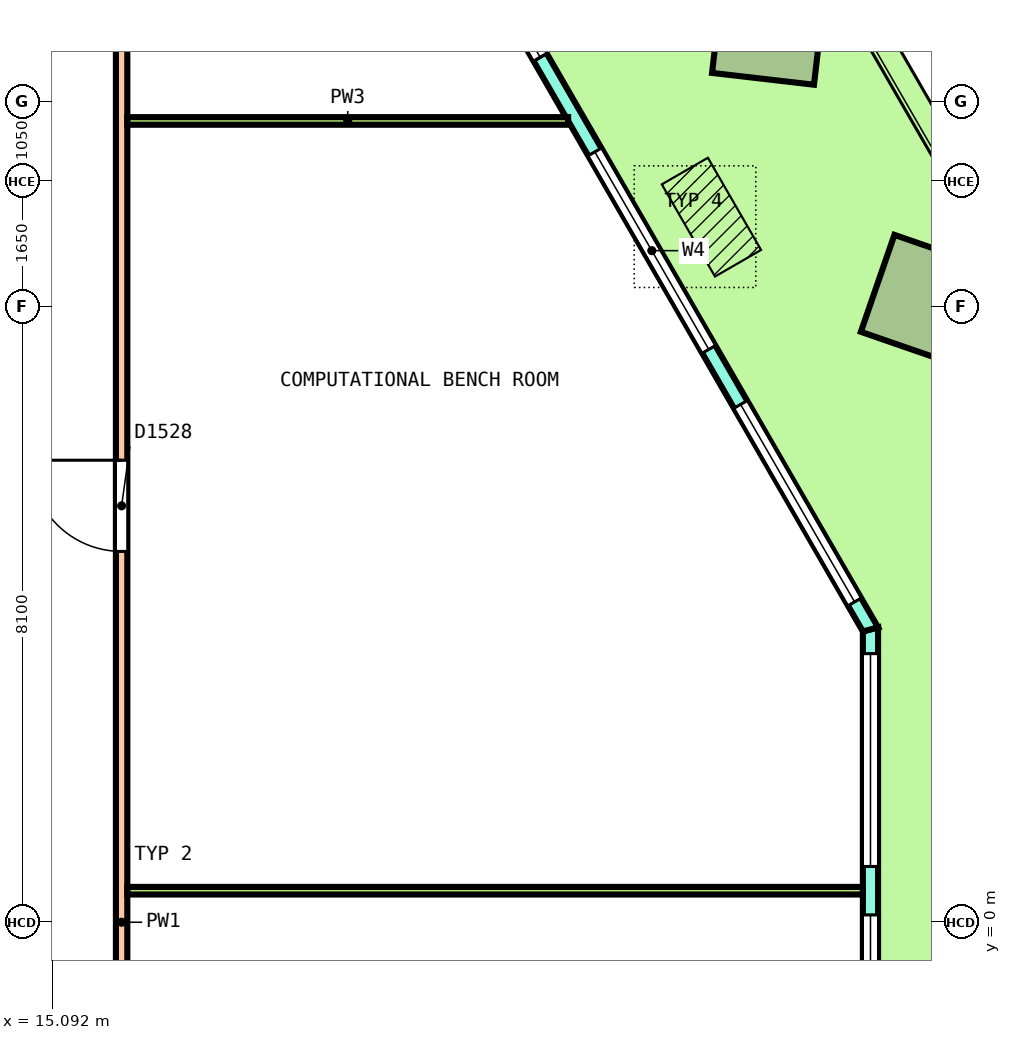
"""IFC4 building model, lengths in metres.
Left out: names, types, materials, properties, quantities, classifications, styles, units other than length and angle.
Written with IfcOpenShell. Run it as: python <this file> out.ifc"""

import sys

from ifc_helpers import new_model, si_unit, direction, frame, frame_2d, origin, origin_2d, place, context, subcontext, project, spatial, polyline, rectangle, outline, extrude, element, fill, save


model = new_model("IFC4")
c1 = context("Model", 3, precision=1e-05, world=origin(), true_north=direction((0.0, 1.0)))
c2 = subcontext(c1, "Body", "Model", "MODEL_VIEW")
j1 = project(units=[si_unit("LENGTHUNIT", "METRE"), si_unit("PLANEANGLEUNIT", "RADIAN")], contexts=[c1])
p1 = place(None, origin())
s1 = spatial("IfcSite", under=j1, at=p1, CompositionType="ELEMENT")
p2 = place(p1, origin())
s2 = spatial("IfcBuilding", under=s1, at=p2, CompositionType="ELEMENT")
p3 = place(p2, frame((0.0, 0.0, 94.0)))
s3 = spatial("IfcBuildingStorey", under=s2, at=p3, CompositionType="ELEMENT", Elevation=94.0)
p4 = place(p3, frame((26.584, 8.184, 0.0), z_axis=(0.021749390218, 0.025123256844, 0.9994477405), x_axis=(-0.500502362591, 0.865666942435, -0.01086875412)))
e1 = element("IfcColumn", 1, at=p4, inside=s3, PredefinedType="COLUMN", context=c2, shape_type="SweptSolid", body=[
    extrude(rectangle(XDim=1.35, YDim=1.35, at=origin_2d()), origin(), (0.0, 0.0, 1.0), 4.052),
])
p5 = place(p3, frame((24.516, 11.766, 0.0), z_axis=(0.025365582388, 0.018858497119, 0.999500347332), x_axis=(-0.500321526885, 0.865832042738, -0.003639162491)))
e2 = element("IfcColumn", 2, at=p5, inside=s3, PredefinedType="COLUMN", context=c2, shape_type="SweptSolid", body=[
    extrude(rectangle(XDim=1.35, YDim=1.35, at=origin_2d()), origin(), (0.0, 0.0, 1.0), 4.052),
])
p6 = place(p3, frame((25.852, -3.022, 0.0), z_axis=(0.0, 0.0, 1.0), x_axis=(0.0, 1.0, 0.0)))
e3 = element("IfcWall", 3, at=p6, inside=s3, PredefinedType="SOLIDWALL", context=c2, shape_type="SweptSolid", body=[
    extrude(outline(polyline([(-0.027, -0.1), (1.128, -0.1), (2.282, -0.1), (3.437, -0.1), (4.592, -0.1), (5.747, -0.1), (6.901, -0.1), (6.848, 0.1), (5.711, 0.1), (4.574, 0.1), (3.437, 0.1), (2.301, 0.1), (1.164, 0.1), (0.027, 0.1), (-0.027, -0.1)])), origin(), (0.0, 0.0, 1.0), 4.1),
])
p7 = place(p6, frame((0.319, 0.0, 0.1)))
e4 = element("IfcOpeningElement", 4, at=p7, cuts=e3, PredefinedType="OPENING", context=c2, shape_type="SweptSolid", body=[
    extrude(rectangle(XDim=2.8, YDim=2.9, at=frame_2d((1.4, 1.45))), frame((0.0, 0.11, 0.0), z_axis=(0.0, -1.0, 0.0), x_axis=(1.0, 0.0, 0.0)), (0.0, 0.0, 1.0), 0.22),
])
p8 = place(p6, frame((3.756, 0.0, 0.1)))
e5 = element("IfcOpeningElement", 5, at=p8, cuts=e3, PredefinedType="OPENING", context=c2, shape_type="SweptSolid", body=[
    extrude(rectangle(XDim=2.8, YDim=2.9, at=frame_2d((1.4, 1.45))), frame((0.0, 0.11, 0.0), z_axis=(0.0, -1.0, 0.0), x_axis=(1.0, 0.0, 0.0)), (0.0, 0.0, 1.0), 0.22),
])
p9 = place(p3, frame((25.852, 3.852, 0.0), z_axis=(0.0, 0.0, 1.0), x_axis=(-0.499998279088, 0.866026397351, 0.0)))
e6 = element("IfcWall", 6, at=p9, inside=s3, PredefinedType="SOLIDWALL", context=c2, shape_type="SweptSolid", body=[
    extrude(outline(polyline([(-0.027, -0.1), (0.985, -0.1), (1.998, -0.1), (3.01, -0.1), (4.022, -0.1), (5.035, -0.1), (6.047, -0.1), (7.059, -0.1), (8.072, -0.1), (9.084, -0.1), (10.096, -0.1), (11.109, -0.1), (12.121, -0.1), (13.133, -0.1), (14.146, -0.1), (15.158, -0.1), (16.17, -0.1), (17.182, -0.1), (18.195, -0.1), (19.207, -0.1), (19.153, 0.1), (18.147, 0.1), (17.14, 0.1), (16.133, 0.1), (15.127, 0.1), (14.12, 0.1), (13.113, 0.1), (12.107, 0.1), (11.1, 0.1), (10.094, 0.1), (9.087, 0.1), (8.08, 0.1), (7.073, 0.1), (6.067, 0.1), (5.06, 0.1), (4.053, 0.1), (3.047, 0.1), (2.04, 0.1), (1.033, 0.1), (0.027, 0.1), (-0.027, -0.1)])), origin(), (0.0, 0.0, 1.0), 4.1),
])
p10 = place(p9, frame((0.418, 0.0, 0.1)))
e7 = element("IfcOpeningElement", 7, at=p10, cuts=e6, PredefinedType="OPENING", context=c2, shape_type="SweptSolid", body=[
    extrude(rectangle(XDim=3.0, YDim=2.9, at=frame_2d((1.5, 1.45))), frame((0.0, 0.11, 0.0), z_axis=(0.0, -1.0, 0.0), x_axis=(1.0, 0.0, 0.0)), (0.0, 0.0, 1.0), 0.22),
])
p11 = place(p9, frame((4.254, 0.0, 0.1)))
e8 = element("IfcOpeningElement", 8, at=p11, cuts=e6, PredefinedType="OPENING", context=c2, shape_type="SweptSolid", body=[
    extrude(rectangle(XDim=3.0, YDim=2.9, at=frame_2d((1.5, 1.45))), frame((0.0, 0.11, 0.0), z_axis=(0.0, -1.0, 0.0), x_axis=(1.0, 0.0, 0.0)), (0.0, 0.0, 1.0), 0.22),
])
p12 = place(p9, frame((8.69, 0.0, 0.0)))
e9 = element("IfcOpeningElement", 9, at=p12, cuts=e6, PredefinedType="OPENING", context=c2, shape_type="SweptSolid", body=[
    extrude(rectangle(XDim=1.8, YDim=2.4, at=frame_2d((0.9, 1.2))), frame((0.0, 0.11, 0.0), z_axis=(0.0, -1.0, 0.0), x_axis=(1.0, 0.0, 0.0)), (0.0, 0.0, 1.0), 0.22),
])
p13 = place(p9, frame((8.69, 0.0, 2.55)))
e10 = element("IfcOpeningElement", 10, at=p13, cuts=e6, PredefinedType="OPENING", context=c2, shape_type="SweptSolid", body=[
    extrude(rectangle(XDim=1.8, YDim=0.45, at=frame_2d((0.9, 0.225))), frame((0.0, 0.11, 0.0), z_axis=(0.0, -1.0, 0.0), x_axis=(1.0, 0.0, 0.0)), (0.0, 0.0, 1.0), 0.22),
])
p14 = place(p9, frame((11.926, 0.0, 0.1)))
e11 = element("IfcOpeningElement", 11, at=p14, cuts=e6, PredefinedType="OPENING", context=c2, shape_type="SweptSolid", body=[
    extrude(rectangle(XDim=3.0, YDim=2.9, at=frame_2d((1.5, 1.45))), frame((0.0, 0.11, 0.0), z_axis=(0.0, -1.0, 0.0), x_axis=(1.0, 0.0, 0.0)), (0.0, 0.0, 1.0), 0.22),
])
p15 = place(p9, frame((15.762, 0.0, 0.1)))
e12 = element("IfcOpeningElement", 12, at=p15, cuts=e6, PredefinedType="OPENING", context=c2, shape_type="SweptSolid", body=[
    extrude(rectangle(XDim=3.0, YDim=2.9, at=frame_2d((1.5, 1.45))), frame((0.0, 0.11, 0.0), z_axis=(0.0, -1.0, 0.0), x_axis=(1.0, 0.0, 0.0)), (0.0, 0.0, 1.0), 0.22),
])
p16 = place(p3, frame((16.0, -13.525, 0.0), z_axis=(0.0, 0.0, 1.0), x_axis=(0.0, 1.0, 0.0)))
e13 = element("IfcWall", 13, at=p16, inside=s3, PredefinedType="PARTITIONING", context=c2, shape_type="SweptSolid", body=[
    extrude(rectangle(XDim=27.05, YDim=0.15, at=frame_2d((13.525, 0.0))), origin(), (0.0, 0.0, 1.0), 3.05),
])
p17 = place(p16, frame((18.403, 0.0, 0.0)))
e14 = element("IfcOpeningElement", 14, at=p17, cuts=e13, PredefinedType="OPENING", context=c2, shape_type="SweptSolid", body=[
    extrude(rectangle(XDim=1.2, YDim=2.1, at=frame_2d((0.6, 1.05))), frame((0.0, 0.085, 0.0), z_axis=(0.0, -1.0, 0.0), x_axis=(1.0, 0.0, 0.0)), (0.0, 0.0, 1.0), 0.17),
])
p18 = place(p16, frame((25.435, 0.0, 0.0)))
e15 = element("IfcOpeningElement", 15, at=p18, cuts=e13, PredefinedType="OPENING", context=c2, shape_type="SweptSolid", body=[
    extrude(rectangle(XDim=1.0, YDim=2.1, at=frame_2d((0.5, 1.05))), frame((0.0, 0.085, 0.0), z_axis=(0.0, -1.0, 0.0), x_axis=(1.0, 0.0, 0.0)), (0.0, 0.0, 1.0), 0.17),
])
p19 = place(p16, frame((1.542, 0.0, 0.0)))
e16 = element("IfcOpeningElement", 16, at=p19, cuts=e13, PredefinedType="OPENING", context=c2, shape_type="SweptSolid", body=[
    extrude(rectangle(XDim=1.0, YDim=2.1, at=frame_2d((0.5, 1.05))), frame((0.0, 0.085, 0.0), z_axis=(0.0, -1.0, 0.0), x_axis=(1.0, 0.0, 0.0)), (0.0, 0.0, 1.0), 0.17),
])
p20 = place(p16, frame((4.605, 0.0, 0.0)))
e17 = element("IfcOpeningElement", 17, at=p20, cuts=e13, PredefinedType="OPENING", context=c2, shape_type="SweptSolid", body=[
    extrude(rectangle(XDim=1.0, YDim=2.1, at=frame_2d((0.5, 1.05))), frame((0.0, 0.085, 0.0), z_axis=(0.0, -1.0, 0.0), x_axis=(1.0, 0.0, 0.0)), (0.0, 0.0, 1.0), 0.17),
])
p21 = place(p16, frame((7.904, 0.0, 0.0)))
e18 = element("IfcOpeningElement", 18, at=p21, cuts=e13, PredefinedType="OPENING", context=c2, shape_type="SweptSolid", body=[
    extrude(rectangle(XDim=1.0, YDim=2.1, at=frame_2d((0.5, 1.05))), frame((0.0, 0.085, 0.0), z_axis=(0.0, -1.0, 0.0), x_axis=(1.0, 0.0, 0.0)), (0.0, 0.0, 1.0), 0.17),
])
p22 = place(p16, frame((11.267, 0.0, 0.0)))
e19 = element("IfcOpeningElement", 19, at=p22, cuts=e13, PredefinedType="OPENING", context=c2, shape_type="SweptSolid", body=[
    extrude(rectangle(XDim=1.0, YDim=2.1, at=frame_2d((0.5, 1.05))), frame((0.0, 0.085, 0.0), z_axis=(0.0, -1.0, 0.0), x_axis=(1.0, 0.0, 0.0)), (0.0, 0.0, 1.0), 0.17),
])
p23 = place(p3, frame((16.075, 10.542, 0.0), z_axis=(0.0, 0.0, 1.0), x_axis=(1.0, 0.0, 0.0)))
e20 = element("IfcWall", 20, at=p23, inside=s3, PredefinedType="PARTITIONING", context=c2, shape_type="SweptSolid", body=[
    extrude(rectangle(XDim=5.8, YDim=0.1, at=frame_2d((2.9, 0.0))), origin(), (0.0, 0.0, 1.0), 3.05),
])
p24 = place(p3, frame((16.075, 0.415, 0.0), z_axis=(0.0, 0.0, 1.0), x_axis=(1.0, 0.0, 0.0)))
e21 = element("IfcWall", 21, at=p24, inside=s3, PredefinedType="PARTITIONING", context=c2, shape_type="SweptSolid", body=[
    extrude(rectangle(XDim=9.677, YDim=0.1, at=frame_2d((4.839, 0.0))), origin(), (0.0, 0.0, 1.0), 3.05),
])
p25 = place(p7, origin())
e22 = element("IfcWindow", 22, at=p25, inside=s3, PartitioningType="SINGLE_PANEL", PredefinedType="WINDOW", context=c2, shape_type="SweptSolid", body=[
    extrude(rectangle(XDim=2.8, YDim=2.9, at=frame_2d((1.4, 1.45))), frame((0.0, 0.03, 0.0), z_axis=(0.0, -1.0, 0.0), x_axis=(1.0, 0.0, 0.0)), (0.0, 0.0, 1.0), 0.06),
])
fill(e4, e22)
p26 = place(p8, origin())
e23 = element("IfcWindow", 23, at=p26, inside=s3, PartitioningType="SINGLE_PANEL", PredefinedType="WINDOW", context=c2, shape_type="SweptSolid", body=[
    extrude(rectangle(XDim=2.8, YDim=2.9, at=frame_2d((1.4, 1.45))), frame((0.0, 0.03, 0.0), z_axis=(0.0, -1.0, 0.0), x_axis=(1.0, 0.0, 0.0)), (0.0, 0.0, 1.0), 0.06),
])
fill(e5, e23)
p27 = place(p10, origin())
e24 = element("IfcWindow", 24, at=p27, inside=s3, PartitioningType="SINGLE_PANEL", PredefinedType="WINDOW", context=c2, shape_type="SweptSolid", body=[
    extrude(rectangle(XDim=3.0, YDim=2.9, at=frame_2d((1.5, 1.45))), frame((0.0, 0.03, 0.0), z_axis=(0.0, -1.0, 0.0), x_axis=(1.0, 0.0, 0.0)), (0.0, 0.0, 1.0), 0.06),
])
fill(e7, e24)
p28 = place(p11, origin())
e25 = element("IfcWindow", 25, at=p28, inside=s3, PartitioningType="SINGLE_PANEL", PredefinedType="WINDOW", context=c2, shape_type="SweptSolid", body=[
    extrude(rectangle(XDim=3.0, YDim=2.9, at=frame_2d((1.5, 1.45))), frame((0.0, 0.03, 0.0), z_axis=(0.0, -1.0, 0.0), x_axis=(1.0, 0.0, 0.0)), (0.0, 0.0, 1.0), 0.06),
])
fill(e8, e25)
p29 = place(p12, origin())
e26 = element("IfcDoor", 26, at=p29, inside=s3, OperationType="DOUBLE_DOOR_SINGLE_SWING", PredefinedType="DOOR", context=c2, shape_type="SweptSolid", body=[
    extrude(rectangle(XDim=1.8, YDim=2.4, at=frame_2d((0.9, 1.2))), frame((0.0, 0.025, 0.0), z_axis=(0.0, -1.0, 0.0), x_axis=(1.0, 0.0, 0.0)), (0.0, 0.0, 1.0), 0.05),
])
fill(e9, e26)
p30 = place(p13, origin())
e27 = element("IfcWindow", 27, at=p30, inside=s3, PartitioningType="SINGLE_PANEL", PredefinedType="WINDOW", context=c2, shape_type="SweptSolid", body=[
    extrude(rectangle(XDim=1.8, YDim=0.45, at=frame_2d((0.9, 0.225))), frame((0.0, 0.03, 0.0), z_axis=(0.0, -1.0, 0.0), x_axis=(1.0, 0.0, 0.0)), (0.0, 0.0, 1.0), 0.06),
])
fill(e10, e27)
p31 = place(p17, origin())
e28 = element("IfcDoor", 28, at=p31, inside=s3, OperationType="DOUBLE_DOOR_SINGLE_SWING", PredefinedType="DOOR", context=c2, shape_type="SweptSolid", body=[
    extrude(rectangle(XDim=1.2, YDim=2.1, at=frame_2d((0.6, 1.05))), frame((0.0, 0.025, 0.0), z_axis=(0.0, -1.0, 0.0), x_axis=(1.0, 0.0, 0.0)), (0.0, 0.0, 1.0), 0.05),
])
fill(e14, e28)
save(model, sys.argv[1])
